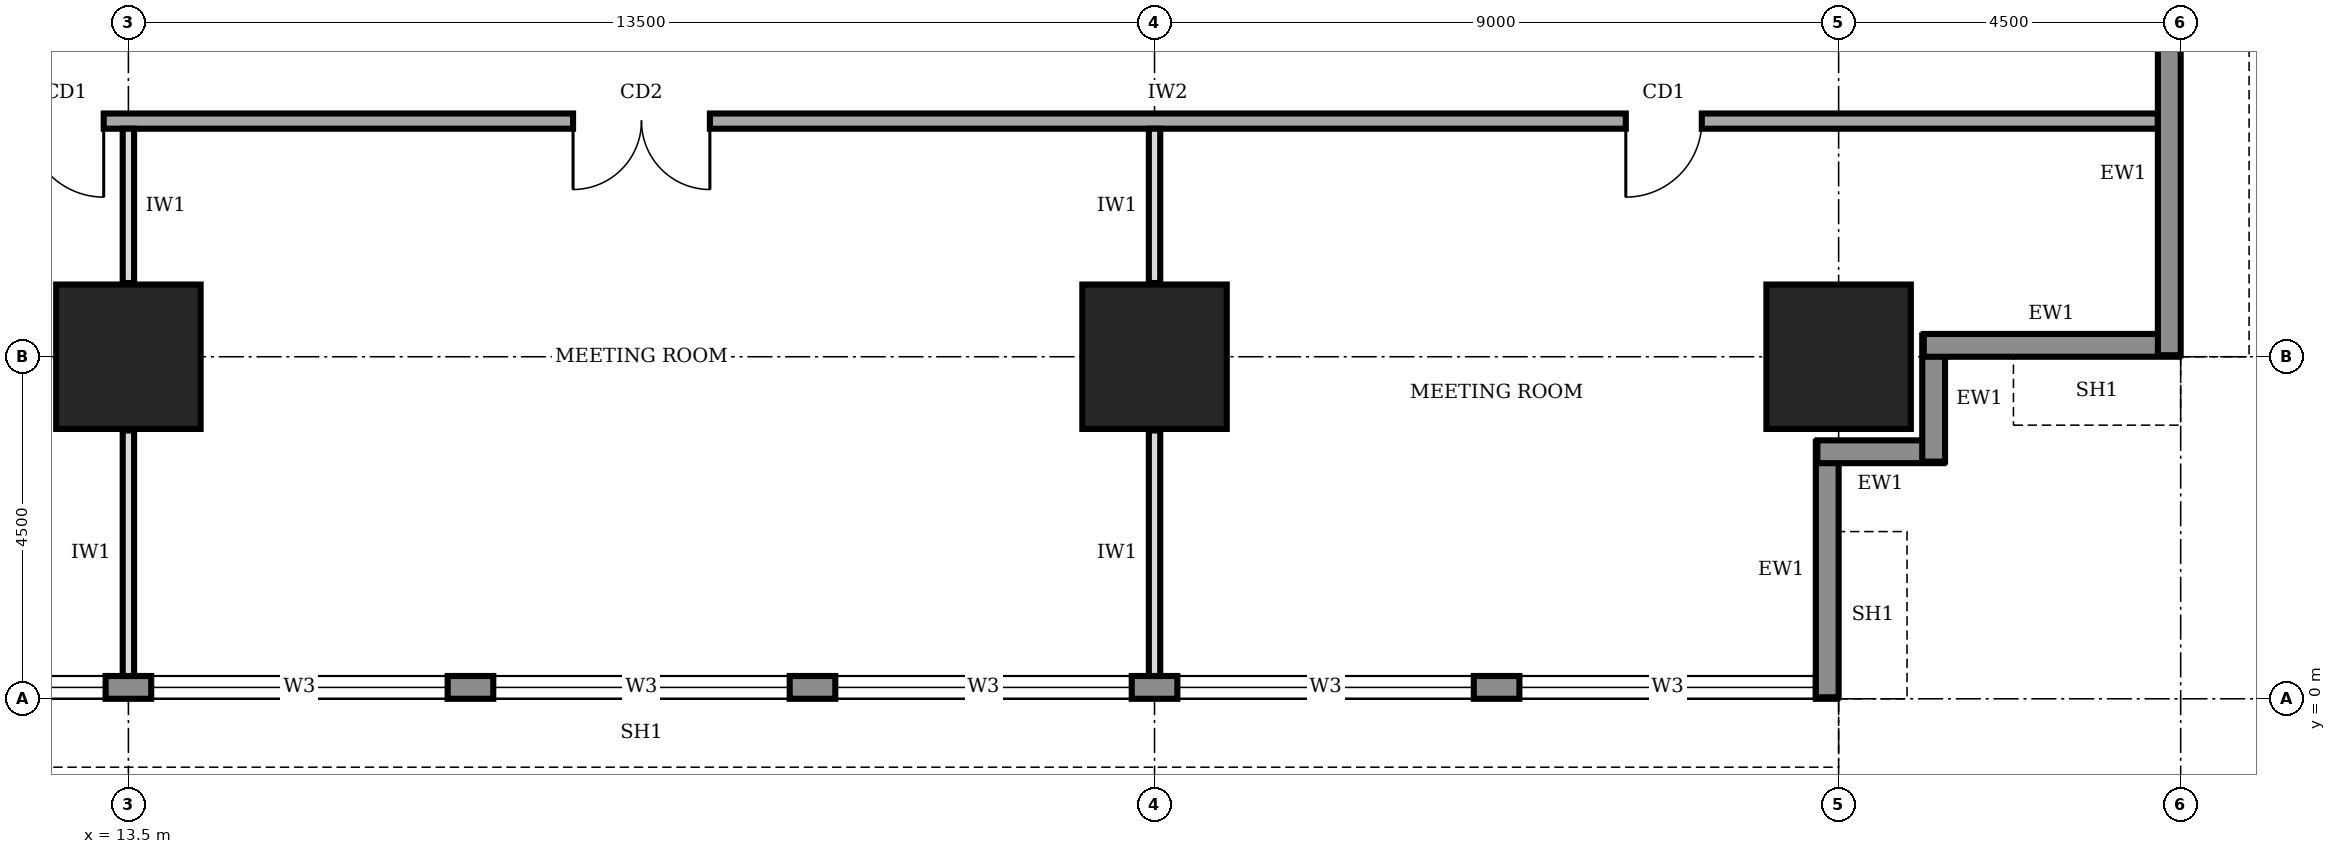
"""IFC4 building model, lengths in metres.
Left out: names, types, materials, properties, quantities, classifications, styles, units other than length and angle.
Written with IfcOpenShell. Run it as: python <this file> out.ifc"""

import sys

from ifc_helpers import new_model, si_unit, direction, frame, frame_2d, origin, origin_2d, place, context, subcontext, project, spatial, rectangle, extrude, element, fill, save


model = new_model("IFC4")
c1 = context("Model", 3, precision=1e-05, world=origin(), true_north=direction((0.0, 1.0)))
c2 = subcontext(c1, "Body", "Model", "MODEL_VIEW")
j1 = project(units=[si_unit("LENGTHUNIT", "METRE"), si_unit("PLANEANGLEUNIT", "RADIAN")], contexts=[c1])
p1 = place(None, origin())
s1 = spatial("IfcSite", under=j1, at=p1, CompositionType="ELEMENT")
p2 = place(p1, origin())
s2 = spatial("IfcBuilding", under=s1, at=p2, CompositionType="ELEMENT")
p3 = place(p2, frame((0.0, 0.0, 89.0)))
s3 = spatial("IfcBuildingStorey", under=s2, at=p3, CompositionType="ELEMENT", Elevation=89.0)
for number, where, z_axis, x_axis in (
    (1, (13.5, 4.5, 0.0), (0.0, 0.0, 1.0), (1.0, 0.0, 0.0)),
    (2, (27.0, 4.5, 0.0), (0.0, 0.0, 1.0), (1.0, 0.0, 0.0)),
    (3, (36.0, 4.5, 0.0), (0.0, 0.0, 1.0), (1.0, 0.0, 0.0)),
):
    element("IfcColumn", number, at=place(p3, frame(where, z_axis=z_axis, x_axis=x_axis)), inside=s3, PredefinedType="COLUMN", context=c2, shape_type="SweptSolid", body=[
        extrude(rectangle(XDim=1.9, YDim=1.9, at=origin_2d()), origin(), (0.0, 0.0, 1.0), 4.0),
    ])
p4 = place(p3, frame((4.52, 0.15, 0.0), z_axis=(0.0, 0.0, 1.0), x_axis=(1.0, 0.0, 0.0)))
e4 = element("IfcWall", 4, at=p4, inside=s3, PredefinedType="STANDARD", context=c2, shape_type="SweptSolid", body=[
    extrude(rectangle(XDim=31.46, YDim=0.3, at=frame_2d((15.73, 0.0))), origin(), (0.0, 0.0, 1.0), 3.75),
])
p5 = place(p4, frame((4.78, 0.0, 0.95)))
e5 = element("IfcOpeningElement", 5, at=p5, cuts=e4, PredefinedType="OPENING", context=c2, shape_type="SweptSolid", body=[
    extrude(rectangle(XDim=3.9, YDim=1.8, at=frame_2d((1.95, 0.9))), frame((0.0, 0.16, 0.0), z_axis=(0.0, -1.0, 0.0), x_axis=(1.0, 0.0, 0.0)), (0.0, 0.0, 1.0), 0.32),
])
p6 = place(p4, frame((9.28, 0.0, 0.95)))
e6 = element("IfcOpeningElement", 6, at=p6, cuts=e4, PredefinedType="OPENING", context=c2, shape_type="SweptSolid", body=[
    extrude(rectangle(XDim=3.9, YDim=1.8, at=frame_2d((1.95, 0.9))), frame((0.0, 0.16, 0.0), z_axis=(0.0, -1.0, 0.0), x_axis=(1.0, 0.0, 0.0)), (0.0, 0.0, 1.0), 0.32),
])
p7 = place(p4, frame((13.78, 0.0, 0.95)))
e7 = element("IfcOpeningElement", 7, at=p7, cuts=e4, PredefinedType="OPENING", context=c2, shape_type="SweptSolid", body=[
    extrude(rectangle(XDim=3.9, YDim=1.8, at=frame_2d((1.95, 0.9))), frame((0.0, 0.16, 0.0), z_axis=(0.0, -1.0, 0.0), x_axis=(1.0, 0.0, 0.0)), (0.0, 0.0, 1.0), 0.32),
])
p8 = place(p4, frame((18.28, 0.0, 0.95)))
e8 = element("IfcOpeningElement", 8, at=p8, cuts=e4, PredefinedType="OPENING", context=c2, shape_type="SweptSolid", body=[
    extrude(rectangle(XDim=3.9, YDim=1.8, at=frame_2d((1.95, 0.9))), frame((0.0, 0.16, 0.0), z_axis=(0.0, -1.0, 0.0), x_axis=(1.0, 0.0, 0.0)), (0.0, 0.0, 1.0), 0.32),
])
p9 = place(p4, frame((22.78, 0.0, 0.95)))
e9 = element("IfcOpeningElement", 9, at=p9, cuts=e4, PredefinedType="OPENING", context=c2, shape_type="SweptSolid", body=[
    extrude(rectangle(XDim=3.9, YDim=1.8, at=frame_2d((1.95, 0.9))), frame((0.0, 0.16, 0.0), z_axis=(0.0, -1.0, 0.0), x_axis=(1.0, 0.0, 0.0)), (0.0, 0.0, 1.0), 0.32),
])
p10 = place(p4, frame((27.28, 0.0, 0.95)))
e10 = element("IfcOpeningElement", 10, at=p10, cuts=e4, PredefinedType="OPENING", context=c2, shape_type="SweptSolid", body=[
    extrude(rectangle(XDim=3.9, YDim=1.8, at=frame_2d((1.95, 0.9))), frame((0.0, 0.16, 0.0), z_axis=(0.0, -1.0, 0.0), x_axis=(1.0, 0.0, 0.0)), (0.0, 0.0, 1.0), 0.32),
])
p11 = place(p3, frame((35.85, 0.02, 0.0), z_axis=(0.0, 0.0, 1.0), x_axis=(0.0, 1.0, 0.0)))
e11 = element("IfcWall", 11, at=p11, inside=s3, PredefinedType="STANDARD", context=c2, shape_type="SweptSolid", body=[
    extrude(rectangle(XDim=3.36, YDim=0.3, at=frame_2d((1.68, 0.0))), origin(), (0.0, 0.0, 1.0), 2.85),
])
for number, where, z_axis, x_axis in (
    (12, (35.72, 3.25, 0.0), (0.0, 0.0, 1.0), (1.0, 0.0, 0.0)),
    (13, (37.25, 3.12, 0.0), (0.0, 0.0, 1.0), (0.0, 1.0, 0.0)),
):
    element("IfcWall", number, at=place(p3, frame(where, z_axis=z_axis, x_axis=x_axis)), inside=s3, PredefinedType="STANDARD", context=c2, shape_type="SweptSolid", body=[
        extrude(rectangle(XDim=1.66, YDim=0.3, at=frame_2d((0.83, 0.0))), origin(), (0.0, 0.0, 1.0), 3.75),
    ])
p12 = place(p3, frame((37.12, 4.65, 0.0), z_axis=(0.0, 0.0, 1.0), x_axis=(1.0, 0.0, 0.0)))
e14 = element("IfcWall", 14, at=p12, inside=s3, PredefinedType="STANDARD", context=c2, shape_type="SweptSolid", body=[
    extrude(rectangle(XDim=3.36, YDim=0.3, at=frame_2d((1.68, 0.0))), origin(), (0.0, 0.0, 1.0), 2.85),
])
p13 = place(p3, frame((40.35, 4.52, 0.0), z_axis=(0.0, 0.0, 1.0), x_axis=(0.0, 1.0, 0.0)))
e15 = element("IfcWall", 15, at=p13, inside=s3, PredefinedType="STANDARD", context=c2, shape_type="SweptSolid", body=[
    extrude(rectangle(XDim=31.46, YDim=0.3, at=frame_2d((15.73, 0.0))), origin(), (0.0, 0.0, 1.0), 3.75),
])
p14 = place(p13, frame((4.78, 0.0, 0.95)))
e16 = element("IfcOpeningElement", 16, at=p14, cuts=e15, PredefinedType="OPENING", context=c2, shape_type="SweptSolid", body=[
    extrude(rectangle(XDim=3.9, YDim=1.8, at=frame_2d((1.95, 0.9))), frame((0.0, 0.16, 0.0), z_axis=(0.0, -1.0, 0.0), x_axis=(1.0, 0.0, 0.0)), (0.0, 0.0, 1.0), 0.32),
])
p15 = place(p13, frame((9.28, 0.0, 0.95)))
e17 = element("IfcOpeningElement", 17, at=p15, cuts=e15, PredefinedType="OPENING", context=c2, shape_type="SweptSolid", body=[
    extrude(rectangle(XDim=3.9, YDim=1.8, at=frame_2d((1.95, 0.9))), frame((0.0, 0.16, 0.0), z_axis=(0.0, -1.0, 0.0), x_axis=(1.0, 0.0, 0.0)), (0.0, 0.0, 1.0), 0.32),
])
p16 = place(p13, frame((13.78, 0.0, 0.95)))
e18 = element("IfcOpeningElement", 18, at=p16, cuts=e15, PredefinedType="OPENING", context=c2, shape_type="SweptSolid", body=[
    extrude(rectangle(XDim=3.9, YDim=1.8, at=frame_2d((1.95, 0.9))), frame((0.0, 0.16, 0.0), z_axis=(0.0, -1.0, 0.0), x_axis=(1.0, 0.0, 0.0)), (0.0, 0.0, 1.0), 0.32),
])
p17 = place(p13, frame((18.28, 0.0, 0.95)))
e19 = element("IfcOpeningElement", 19, at=p17, cuts=e15, PredefinedType="OPENING", context=c2, shape_type="SweptSolid", body=[
    extrude(rectangle(XDim=3.9, YDim=1.8, at=frame_2d((1.95, 0.9))), frame((0.0, 0.16, 0.0), z_axis=(0.0, -1.0, 0.0), x_axis=(1.0, 0.0, 0.0)), (0.0, 0.0, 1.0), 0.32),
])
p18 = place(p13, frame((22.78, 0.0, 0.95)))
e20 = element("IfcOpeningElement", 20, at=p18, cuts=e15, PredefinedType="OPENING", context=c2, shape_type="SweptSolid", body=[
    extrude(rectangle(XDim=3.9, YDim=1.8, at=frame_2d((1.95, 0.9))), frame((0.0, 0.16, 0.0), z_axis=(0.0, -1.0, 0.0), x_axis=(1.0, 0.0, 0.0)), (0.0, 0.0, 1.0), 0.32),
])
p19 = place(p13, frame((27.28, 0.0, 0.95)))
e21 = element("IfcOpeningElement", 21, at=p19, cuts=e15, PredefinedType="OPENING", context=c2, shape_type="SweptSolid", body=[
    extrude(rectangle(XDim=3.9, YDim=1.8, at=frame_2d((1.95, 0.9))), frame((0.0, 0.16, 0.0), z_axis=(0.0, -1.0, 0.0), x_axis=(1.0, 0.0, 0.0)), (0.0, 0.0, 1.0), 0.32),
])
p20 = place(p3, frame((11.9, 7.6, 0.0), z_axis=(0.0, 0.0, 1.0), x_axis=(1.0, 0.0, 0.0)))
e22 = element("IfcWall", 22, at=p20, inside=s3, PredefinedType="SOLIDWALL", context=c2, shape_type="SweptSolid", body=[
    extrude(rectangle(XDim=28.3, YDim=0.2, at=frame_2d((14.15, 0.0))), origin(), (0.0, 0.0, 1.0), 3.75),
])
p21 = place(p20, frame((0.275, 0.0, 0.0)))
e23 = element("IfcOpeningElement", 23, at=p21, cuts=e22, PredefinedType="OPENING", context=c2, shape_type="SweptSolid", body=[
    extrude(rectangle(XDim=1.0, YDim=2.1, at=frame_2d((0.5, 1.05))), frame((0.0, 0.11, 0.0), z_axis=(0.0, -1.0, 0.0), x_axis=(1.0, 0.0, 0.0)), (0.0, 0.0, 1.0), 0.22),
])
p22 = place(p20, frame((7.45, 0.0, 0.0)))
e24 = element("IfcOpeningElement", 24, at=p22, cuts=e22, PredefinedType="OPENING", context=c2, shape_type="SweptSolid", body=[
    extrude(rectangle(XDim=1.8, YDim=2.1, at=frame_2d((0.9, 1.05))), frame((0.0, 0.11, 0.0), z_axis=(0.0, -1.0, 0.0), x_axis=(1.0, 0.0, 0.0)), (0.0, 0.0, 1.0), 0.22),
])
p23 = place(p20, frame((21.3, 0.0, 0.0)))
e25 = element("IfcOpeningElement", 25, at=p23, cuts=e22, PredefinedType="OPENING", context=c2, shape_type="SweptSolid", body=[
    extrude(rectangle(XDim=1.0, YDim=2.1, at=frame_2d((0.5, 1.05))), frame((0.0, 0.11, 0.0), z_axis=(0.0, -1.0, 0.0), x_axis=(1.0, 0.0, 0.0)), (0.0, 0.0, 1.0), 0.22),
])
p24 = place(p3, frame((13.5, 0.3, 0.0), z_axis=(0.0, 0.0, 1.0), x_axis=(0.0, 1.0, 0.0)))
e26 = element("IfcWall", 26, at=p24, inside=s3, PredefinedType="PARTITIONING", context=c2, shape_type="SweptSolid", body=[
    extrude(rectangle(XDim=3.23, YDim=0.15, at=frame_2d((1.615, 0.0))), origin(), (0.0, 0.0, 1.0), 2.85),
])
p25 = place(p3, frame((13.5, 5.47, 0.0), z_axis=(0.0, 0.0, 1.0), x_axis=(0.0, 1.0, 0.0)))
e27 = element("IfcWall", 27, at=p25, inside=s3, PredefinedType="PARTITIONING", context=c2, shape_type="SweptSolid", body=[
    extrude(rectangle(XDim=2.03, YDim=0.15, at=frame_2d((1.015, 0.0))), origin(), (0.0, 0.0, 1.0), 2.85),
])
p26 = place(p3, frame((27.0, 0.3, 0.0), z_axis=(0.0, 0.0, 1.0), x_axis=(0.0, 1.0, 0.0)))
e28 = element("IfcWall", 28, at=p26, inside=s3, PredefinedType="PARTITIONING", context=c2, shape_type="SweptSolid", body=[
    extrude(rectangle(XDim=3.23, YDim=0.15, at=frame_2d((1.615, 0.0))), origin(), (0.0, 0.0, 1.0), 2.85),
])
p27 = place(p3, frame((27.0, 5.47, 0.0), z_axis=(0.0, 0.0, 1.0), x_axis=(0.0, 1.0, 0.0)))
e29 = element("IfcWall", 29, at=p27, inside=s3, PredefinedType="PARTITIONING", context=c2, shape_type="SweptSolid", body=[
    extrude(rectangle(XDim=2.03, YDim=0.15, at=frame_2d((1.015, 0.0))), origin(), (0.0, 0.0, 1.0), 2.85),
])
p28 = place(p5, origin())
e30 = element("IfcWindow", 30, at=p28, inside=s3, PartitioningType="SINGLE_PANEL", PredefinedType="WINDOW", context=c2, shape_type="SweptSolid", body=[
    extrude(rectangle(XDim=3.9, YDim=1.8, at=frame_2d((1.95, 0.9))), frame((0.0, 0.03, 0.0), z_axis=(0.0, -1.0, 0.0), x_axis=(1.0, 0.0, 0.0)), (0.0, 0.0, 1.0), 0.06),
])
fill(e5, e30)
p29 = place(p6, origin())
e31 = element("IfcWindow", 31, at=p29, inside=s3, PartitioningType="SINGLE_PANEL", PredefinedType="WINDOW", context=c2, shape_type="SweptSolid", body=[
    extrude(rectangle(XDim=3.9, YDim=1.8, at=frame_2d((1.95, 0.9))), frame((0.0, 0.03, 0.0), z_axis=(0.0, -1.0, 0.0), x_axis=(1.0, 0.0, 0.0)), (0.0, 0.0, 1.0), 0.06),
])
fill(e6, e31)
p30 = place(p7, origin())
e32 = element("IfcWindow", 32, at=p30, inside=s3, PartitioningType="SINGLE_PANEL", PredefinedType="WINDOW", context=c2, shape_type="SweptSolid", body=[
    extrude(rectangle(XDim=3.9, YDim=1.8, at=frame_2d((1.95, 0.9))), frame((0.0, 0.03, 0.0), z_axis=(0.0, -1.0, 0.0), x_axis=(1.0, 0.0, 0.0)), (0.0, 0.0, 1.0), 0.06),
])
fill(e7, e32)
p31 = place(p8, origin())
e33 = element("IfcWindow", 33, at=p31, inside=s3, PartitioningType="SINGLE_PANEL", PredefinedType="WINDOW", context=c2, shape_type="SweptSolid", body=[
    extrude(rectangle(XDim=3.9, YDim=1.8, at=frame_2d((1.95, 0.9))), frame((0.0, 0.03, 0.0), z_axis=(0.0, -1.0, 0.0), x_axis=(1.0, 0.0, 0.0)), (0.0, 0.0, 1.0), 0.06),
])
fill(e8, e33)
p32 = place(p9, origin())
e34 = element("IfcWindow", 34, at=p32, inside=s3, PartitioningType="SINGLE_PANEL", PredefinedType="WINDOW", context=c2, shape_type="SweptSolid", body=[
    extrude(rectangle(XDim=3.9, YDim=1.8, at=frame_2d((1.95, 0.9))), frame((0.0, 0.03, 0.0), z_axis=(0.0, -1.0, 0.0), x_axis=(1.0, 0.0, 0.0)), (0.0, 0.0, 1.0), 0.06),
])
fill(e9, e34)
p33 = place(p10, origin())
e35 = element("IfcWindow", 35, at=p33, inside=s3, PartitioningType="SINGLE_PANEL", PredefinedType="WINDOW", context=c2, shape_type="SweptSolid", body=[
    extrude(rectangle(XDim=3.9, YDim=1.8, at=frame_2d((1.95, 0.9))), frame((0.0, 0.03, 0.0), z_axis=(0.0, -1.0, 0.0), x_axis=(1.0, 0.0, 0.0)), (0.0, 0.0, 1.0), 0.06),
])
fill(e10, e35)
p34 = place(p21, frame((1.0, 0.0, 0.0), z_axis=(0.0, 0.0, 1.0), x_axis=(-1.0, 0.0, 0.0)))
e36 = element("IfcDoor", 36, at=p34, inside=s3, OperationType="SINGLE_SWING_LEFT", PredefinedType="DOOR", context=c2, shape_type="SweptSolid", body=[
    extrude(rectangle(XDim=1.0, YDim=2.1, at=frame_2d((0.5, 1.05))), frame((0.0, 0.025, 0.0), z_axis=(0.0, -1.0, 0.0), x_axis=(1.0, 0.0, 0.0)), (0.0, 0.0, 1.0), 0.05),
])
fill(e23, e36)
p35 = place(p22, frame((1.8, 0.0, 0.0), z_axis=(0.0, 0.0, 1.0), x_axis=(-1.0, 0.0, 0.0)))
e37 = element("IfcDoor", 37, at=p35, inside=s3, OperationType="DOUBLE_DOOR_SINGLE_SWING", PredefinedType="DOOR", context=c2, shape_type="SweptSolid", body=[
    extrude(rectangle(XDim=1.8, YDim=2.1, at=frame_2d((0.9, 1.05))), frame((0.0, 0.025, 0.0), z_axis=(0.0, -1.0, 0.0), x_axis=(1.0, 0.0, 0.0)), (0.0, 0.0, 1.0), 0.05),
])
fill(e24, e37)
p36 = place(p23, frame((1.0, 0.0, 0.0), z_axis=(0.0, 0.0, 1.0), x_axis=(-1.0, 0.0, 0.0)))
e38 = element("IfcDoor", 38, at=p36, inside=s3, OperationType="SINGLE_SWING_RIGHT", PredefinedType="DOOR", context=c2, shape_type="SweptSolid", body=[
    extrude(rectangle(XDim=1.0, YDim=2.1, at=frame_2d((0.5, 1.05))), frame((0.0, 0.025, 0.0), z_axis=(0.0, -1.0, 0.0), x_axis=(1.0, 0.0, 0.0)), (0.0, 0.0, 1.0), 0.05),
])
fill(e25, e38)
save(model, sys.argv[1])
